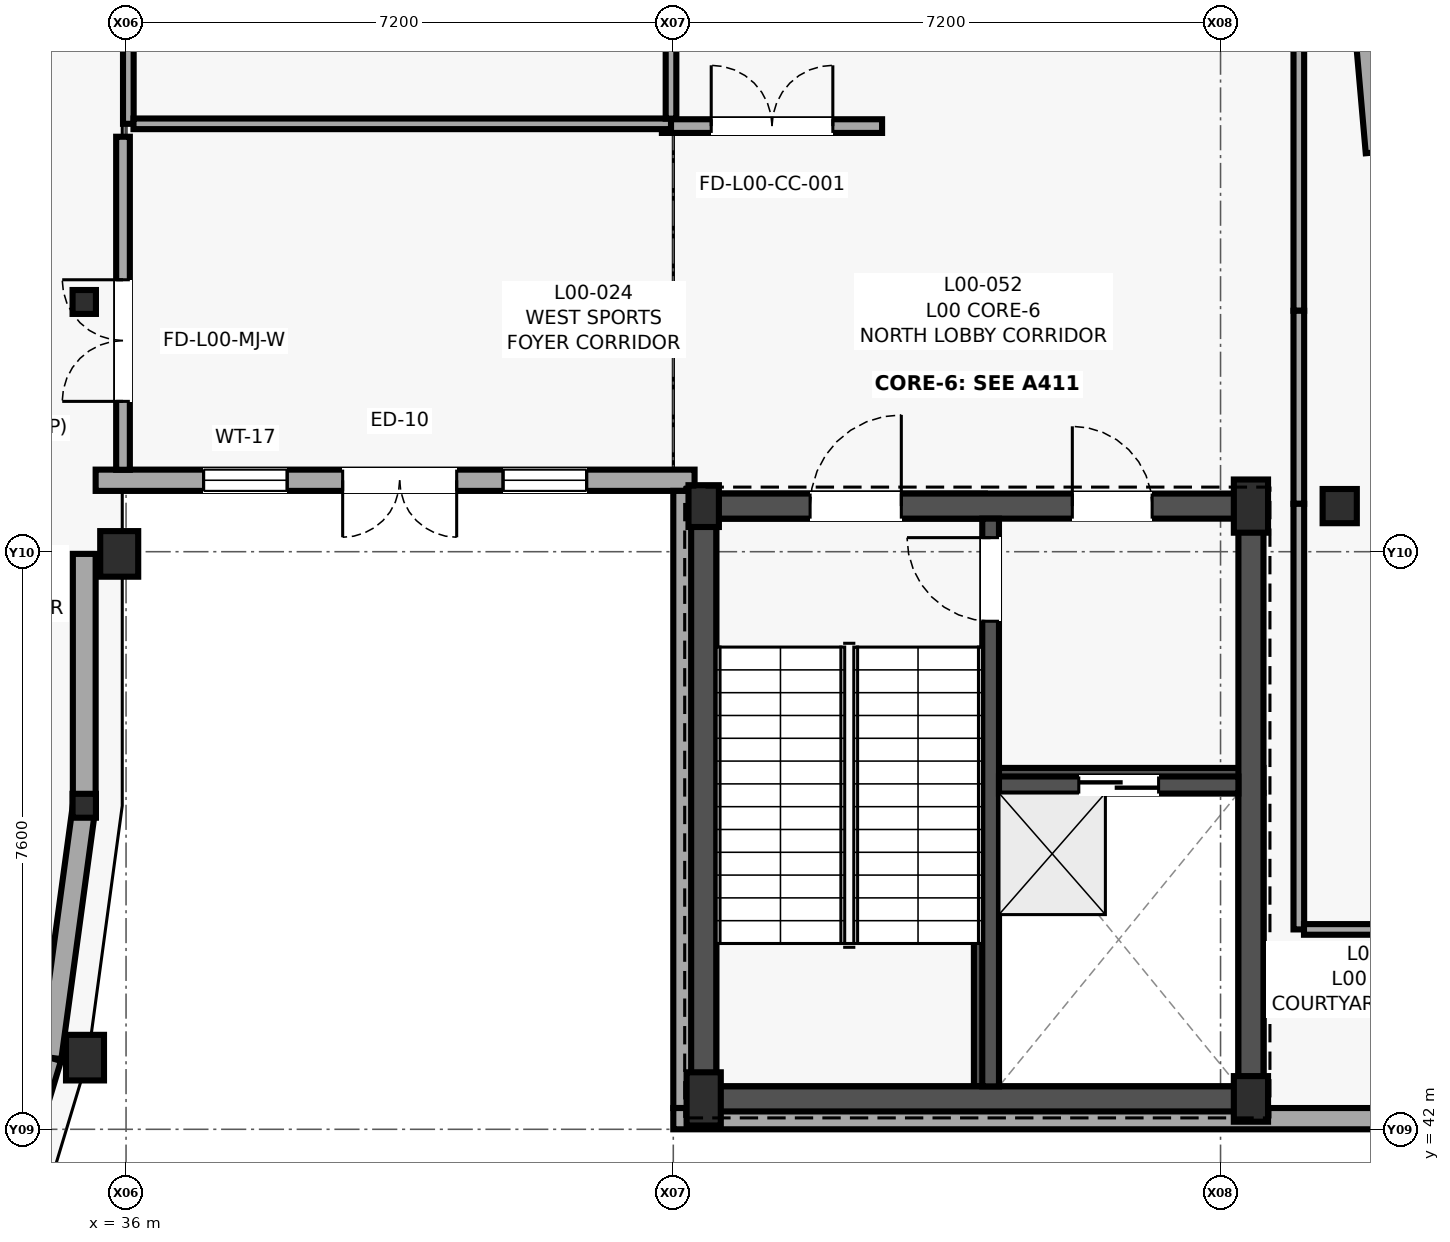
"""IFC4 building model, lengths in metres.
Left out: names, types, materials, properties, quantities, classifications, styles, units other than length and angle.
Written with IfcOpenShell. Run it as: python <this file> out.ifc"""

import sys

from ifc_helpers import new_model, si_unit, direction, frame, frame_2d, origin, origin_2d, place, context, subcontext, project, spatial, rectangle, circle, i_section, extrude, element, fill, save


model = new_model("IFC4")
c1 = context("Model", 3, precision=1e-05, world=origin(), true_north=direction((0.0, 1.0)))
c2 = subcontext(c1, "Body", "Model", "MODEL_VIEW")
j1 = project(units=[si_unit("LENGTHUNIT", "METRE"), si_unit("PLANEANGLEUNIT", "RADIAN")], contexts=[c1])
p1 = place(None, origin())
s1 = spatial("IfcSite", under=j1, at=p1, CompositionType="ELEMENT")
p2 = place(p1, origin())
s2 = spatial("IfcBuilding", under=s1, at=p2, CompositionType="ELEMENT")
p3 = place(p2, origin())
s3 = spatial("IfcBuildingStorey", under=s2, at=p3, CompositionType="ELEMENT", Elevation=0.0)
for number, where, z_axis, x_axis in (
    (1, (47.155, 42.4, -1.55), (0.0, 0.0, 1.0), (1.0, 0.0, 0.0)),
    (2, (47.155, 46.59, -1.55), (0.0, 0.0, 1.0), (1.0, 0.0, 0.0)),
):
    element("IfcWall", number, at=place(p3, frame(where, z_axis=z_axis, x_axis=x_axis)), inside=s3, PredefinedType="SHEAR", context=c2, shape_type="SweptSolid", body=[
        extrude(rectangle(XDim=3.81, YDim=0.33, at=frame_2d((1.905, 0.0))), origin(), (0.0, 0.0, 1.0), 1.3),
    ])
for number, where, z_axis, x_axis in (
    (3, (47.32, 42.565, -1.55), (0.0, 0.0, 1.0), (0.0, 1.0, 0.0)),
    (4, (50.8, 42.565, -1.55), (0.0, 0.0, 1.0), (0.0, 1.0, 0.0)),
):
    element("IfcWall", number, at=place(p3, frame(where, z_axis=z_axis, x_axis=x_axis)), inside=s3, PredefinedType="SHEAR", context=c2, shape_type="SweptSolid", body=[
        extrude(rectangle(XDim=3.86, YDim=0.33, at=frame_2d((1.93, 0.0))), origin(), (0.0, 0.0, 1.0), 1.3),
    ])
p4 = place(p3, frame((43.6, 42.565, -1.85), z_axis=(0.0, 0.0, 1.0), x_axis=(0.0, 1.0, 0.0)))
e5 = element("IfcWall", 5, at=p4, inside=s3, PredefinedType="SHEAR", context=c2, shape_type="SweptSolid", body=[
    extrude(rectangle(XDim=7.47, YDim=0.33, at=frame_2d((3.735, 0.0))), origin(), (0.0, 0.0, 1.0), 1.6),
])
for number, where, z_axis, x_axis in (
    (6, (43.435, 42.4, -1.85), (0.0, 0.0, 1.0), (1.0, 0.0, 0.0)),
    (7, (43.435, 50.2, -1.85), (0.0, 0.0, 1.0), (1.0, 0.0, 0.0)),
):
    element("IfcWall", number, at=place(p3, frame(where, z_axis=z_axis, x_axis=x_axis)), inside=s3, PredefinedType="SHEAR", context=c2, shape_type="SweptSolid", body=[
        extrude(rectangle(XDim=3.865, YDim=0.33, at=frame_2d((1.933, 0.0))), origin(), (0.0, 0.0, 1.0), 1.6),
    ])
for number, where, z_axis, x_axis in (
    (8, (35.45, 46.257, 0.0), (0.0, 0.0, 1.0), (1.0, 0.0, 0.0)),
    (9, (35.45, 52.886, 0.0), (0.0, 0.0, 1.0), (1.0, 0.0, 0.0)),
):
    element("IfcColumn", number, at=place(p3, frame(where, z_axis=z_axis, x_axis=x_axis)), inside=s3, PredefinedType="COLUMN", context=c2, shape_type="SweptSolid", body=[
        extrude(i_section(OverallWidth=0.307, OverallDepth=0.314, WebThickness=0.012, FlangeThickness=0.019, FilletRadius=0.015, at=origin_2d()), origin(), (0.0, 0.0, 1.0), 4.2),
    ])
for number, where, z_axis, x_axis in (
    (10, (35.46, 42.943, 0.0), (0.0, 0.0, 1.0), (1.0, 0.0, 0.0)),
    (11, (35.91, 49.571, 0.0), (0.0, 0.0, 1.0), (1.0, 0.0, 0.0)),
):
    element("IfcColumn", number, at=place(p3, frame(where, z_axis=z_axis, x_axis=x_axis)), inside=s3, PredefinedType="PILASTER", context=c2, shape_type="SweptSolid", body=[
        extrude(rectangle(XDim=0.5, YDim=0.6, at=origin_2d()), origin(), (0.0, 0.0, 1.0), 4.2),
    ])
p5 = place(p3, frame((43.6, 42.4, 0.0), z_axis=(0.0, 0.0, 1.0), x_axis=(1.0, 0.0, 0.0)))
e12 = element("IfcColumn", 12, at=p5, inside=s3, PredefinedType="COLUMN", context=c2, shape_type="SweptSolid", body=[
    extrude(rectangle(XDim=0.45, YDim=0.7, at=origin_2d()), origin(), (0.0, 0.0, 1.0), 4.2),
])
p6 = place(p3, frame((43.6, 50.2, 0.0), z_axis=(0.0, 0.0, 1.0), x_axis=(1.0, 0.0, 0.0)))
e13 = element("IfcColumn", 13, at=p6, inside=s3, PredefinedType="COLUMN", context=c2, shape_type="SweptSolid", body=[
    extrude(rectangle(XDim=0.4, YDim=0.55, at=origin_2d()), origin(), (0.0, 0.0, 1.0), 4.2),
])
p7 = place(p3, frame((50.8, 42.4, 0.0), z_axis=(0.0, 0.0, 1.0), x_axis=(1.0, 0.0, 0.0)))
e14 = element("IfcColumn", 14, at=p7, inside=s3, PredefinedType="COLUMN", context=c2, shape_type="SweptSolid", body=[
    extrude(rectangle(XDim=0.45, YDim=0.6, at=origin_2d()), origin(), (0.0, 0.0, 1.0), 4.2),
])
p8 = place(p3, frame((50.8, 50.2, 0.0), z_axis=(0.0, 0.0, 1.0), x_axis=(1.0, 0.0, 0.0)))
e15 = element("IfcColumn", 15, at=p8, inside=s3, PredefinedType="COLUMN", context=c2, shape_type="SweptSolid", body=[
    extrude(rectangle(XDim=0.45, YDim=0.7, at=origin_2d()), origin(), (0.0, 0.0, 1.0), 4.2),
])
p9 = place(p3, frame((51.968, 50.2, 0.0), z_axis=(0.0, 0.0, 1.0), x_axis=(1.0, 0.0, 0.0)))
e16 = element("IfcColumn", 16, at=p9, inside=s3, PredefinedType="COLUMN", context=c2, shape_type="SweptSolid", body=[
    extrude(circle(Radius=0.225, at=origin_2d()), origin(), (0.0, 0.0, 1.0), 4.2),
])
p10 = place(p3, frame((34.0, 39.629, 0.0), z_axis=(0.0, 0.0, 1.0), x_axis=(0.288868004026, 0.957368934241, 0.0)))
e17 = element("IfcWall", 17, at=p10, inside=s3, PredefinedType="SOLIDWALL", context=c2, shape_type="SweptSolid", body=[
    extrude(rectangle(XDim=3.462, YDim=0.3, at=frame_2d((1.731, 0.0))), origin(), (0.0, 0.0, 1.0), 3.68),
])
p11 = place(p3, frame((35.0, 42.943, 0.0), z_axis=(0.0, 0.0, 1.0), x_axis=(0.134539839792, 0.990908185206, 0.0)))
e18 = element("IfcWall", 18, at=p11, inside=s3, PredefinedType="SOLIDWALL", context=c2, shape_type="SweptSolid", body=[
    extrude(rectangle(XDim=3.344, YDim=0.3, at=frame_2d((1.672, 0.0))), origin(), (0.0, 0.0, 1.0), 3.68),
])
p12 = place(p3, frame((35.45, 46.257, 0.0), z_axis=(0.0, 0.0, 1.0), x_axis=(0.0, 1.0, 0.0)))
e19 = element("IfcWall", 19, at=p12, inside=s3, PredefinedType="SOLIDWALL", context=c2, shape_type="SweptSolid", body=[
    extrude(rectangle(XDim=3.314, YDim=0.3, at=frame_2d((1.657, 0.0))), origin(), (0.0, 0.0, 1.0), 3.68),
])
p13 = place(p3, frame((35.6, 50.54, 0.0), z_axis=(0.0, 0.0, 1.0), x_axis=(1.0, 0.0, 0.0)))
e20 = element("IfcWall", 20, at=p13, inside=s3, PredefinedType="SOLIDWALL", context=c2, shape_type="SweptSolid", body=[
    extrude(rectangle(XDim=7.88, YDim=0.28, at=frame_2d((3.94, 0.0))), origin(), (0.0, 0.0, 1.0), 3.98),
])
p14 = place(p13, frame((3.25, 0.0, 0.0)))
e21 = element("IfcOpeningElement", 21, at=p14, cuts=e20, PredefinedType="OPENING", context=c2, shape_type="SweptSolid", body=[
    extrude(rectangle(XDim=1.5, YDim=2.2, at=frame_2d((0.75, 1.1))), frame((0.0, 0.15, 0.0), z_axis=(0.0, -1.0, 0.0), x_axis=(1.0, 0.0, 0.0)), (0.0, 0.0, 1.0), 0.3),
])
p15 = place(p13, frame((1.42, 0.0, 0.75)))
e22 = element("IfcOpeningElement", 22, at=p15, cuts=e20, PredefinedType="OPENING", context=c2, shape_type="SweptSolid", body=[
    extrude(rectangle(XDim=1.1, YDim=2.1, at=frame_2d((0.55, 1.05))), frame((0.0, 0.15, 0.0), z_axis=(0.0, -1.0, 0.0), x_axis=(1.0, 0.0, 0.0)), (0.0, 0.0, 1.0), 0.3),
])
p16 = place(p13, frame((5.36, 0.0, 0.75)))
e23 = element("IfcOpeningElement", 23, at=p16, cuts=e20, PredefinedType="OPENING", context=c2, shape_type="SweptSolid", body=[
    extrude(rectangle(XDim=1.1, YDim=2.1, at=frame_2d((0.55, 1.05))), frame((0.0, 0.15, 0.0), z_axis=(0.0, -1.0, 0.0), x_axis=(1.0, 0.0, 0.0)), (0.0, 0.0, 1.0), 0.3),
])
p17 = place(p3, frame((43.34, 50.4, 0.0), z_axis=(0.0, 0.0, 1.0), x_axis=(0.0, -1.0, 0.0)))
e24 = element("IfcWall", 24, at=p17, inside=s3, PredefinedType="SOLIDWALL", context=c2, shape_type="SweptSolid", body=[
    extrude(rectangle(XDim=8.12, YDim=0.28, at=frame_2d((4.06, 0.0))), origin(), (0.0, 0.0, 1.0), 3.98),
])
p18 = place(p3, frame((43.2, 42.14, 0.0), z_axis=(0.0, 0.0, 1.0), x_axis=(1.0, 0.0, 0.0)))
e25 = element("IfcWall", 25, at=p18, inside=s3, PredefinedType="SOLIDWALL", context=c2, shape_type="SweptSolid", body=[
    extrude(rectangle(XDim=12.093, YDim=0.28, at=frame_2d((6.046, 0.0))), origin(), (0.0, 0.0, 1.0), 3.98),
])
p19 = place(p18, frame((10.0, 0.0, 0.0)))
e26 = element("IfcOpeningElement", 26, at=p19, cuts=e25, PredefinedType="OPENING", context=c2, shape_type="SweptSolid", body=[
    extrude(rectangle(XDim=1.6, YDim=2.3, at=frame_2d((0.8, 1.15))), frame((0.0, 0.15, 0.0), z_axis=(0.0, -1.0, 0.0), x_axis=(1.0, 0.0, 0.0)), (0.0, 0.0, 1.0), 0.3),
])
p20 = place(p3, frame((52.259, 56.813, 0.0), z_axis=(0.0, 0.0, 1.0), x_axis=(0.086865228015, -0.996220072154, 0.0)))
e27 = element("IfcWall", 27, at=p20, inside=s3, PredefinedType="SOLIDWALL", context=c2, shape_type="SweptSolid", body=[
    extrude(rectangle(XDim=1.967, YDim=0.24, at=frame_2d((0.984, 0.0))), origin(), (0.0, 0.0, 1.0), 3.98),
])
p21 = place(p3, frame((43.435, 42.4, 0.0), z_axis=(0.0, 0.0, 1.0), x_axis=(1.0, 0.0, 0.0)))
e28 = element("IfcWall", 28, at=p21, inside=s3, PredefinedType="SHEAR", context=c2, shape_type="SweptSolid", body=[
    extrude(rectangle(XDim=7.53, YDim=0.33, at=frame_2d((3.765, 0.0))), origin(), (0.0, 0.0, 1.0), 3.98),
])
p22 = place(p3, frame((43.435, 50.2, 0.0), z_axis=(0.0, 0.0, 1.0), x_axis=(1.0, 0.0, 0.0)))
e29 = element("IfcWall", 29, at=p22, inside=s3, PredefinedType="SHEAR", context=c2, shape_type="SweptSolid", body=[
    extrude(rectangle(XDim=7.53, YDim=0.33, at=frame_2d((3.765, 0.0))), origin(), (0.0, 0.0, 1.0), 3.98),
])
p23 = place(p22, frame((5.015, 0.0, 0.0)))
e30 = element("IfcOpeningElement", 30, at=p23, cuts=e29, PredefinedType="OPENING", context=c2, shape_type="SweptSolid", body=[
    extrude(rectangle(XDim=1.05, YDim=2.15, at=frame_2d((0.525, 1.075))), frame((0.0, 0.175, 0.0), z_axis=(0.0, -1.0, 0.0), x_axis=(1.0, 0.0, 0.0)), (0.0, 0.0, 1.0), 0.35),
])
p24 = place(p22, frame((1.565, 0.0, 0.0)))
e31 = element("IfcOpeningElement", 31, at=p24, cuts=e29, PredefinedType="OPENING", context=c2, shape_type="SweptSolid", body=[
    extrude(rectangle(XDim=1.2, YDim=2.2, at=frame_2d((0.6, 1.1))), frame((0.0, 0.175, 0.0), z_axis=(0.0, -1.0, 0.0), x_axis=(1.0, 0.0, 0.0)), (0.0, 0.0, 1.0), 0.35),
])
for number, where, z_axis, x_axis in (
    (32, (43.6, 42.565, 0.0), (0.0, 0.0, 1.0), (0.0, 1.0, 0.0)),
    (33, (50.8, 42.565, 0.0), (0.0, 0.0, 1.0), (0.0, 1.0, 0.0)),
):
    element("IfcWall", number, at=place(p3, frame(where, z_axis=z_axis, x_axis=x_axis)), inside=s3, PredefinedType="SHEAR", context=c2, shape_type="SweptSolid", body=[
        extrude(rectangle(XDim=7.47, YDim=0.33, at=frame_2d((3.735, 0.0))), origin(), (0.0, 0.0, 1.0), 3.98),
    ])
p25 = place(p3, frame((47.375, 42.565, 0.0), z_axis=(0.0, 0.0, 1.0), x_axis=(0.0, 1.0, 0.0)))
e34 = element("IfcWall", 34, at=p25, inside=s3, PredefinedType="SHEAR", context=c2, shape_type="SweptSolid", body=[
    extrude(rectangle(XDim=7.47, YDim=0.22, at=frame_2d((3.735, 0.0))), origin(), (0.0, 0.0, 1.0), 3.98),
])
p26 = place(p25, frame((6.12, 0.0, 0.0)))
e35 = element("IfcOpeningElement", 35, at=p26, cuts=e34, PredefinedType="OPENING", context=c2, shape_type="SweptSolid", body=[
    extrude(rectangle(XDim=1.1, YDim=2.15, at=frame_2d((0.55, 1.075))), frame((0.0, 0.12, 0.0), z_axis=(0.0, -1.0, 0.0), x_axis=(1.0, 0.0, 0.0)), (0.0, 0.0, 1.0), 0.24),
])
p27 = place(p3, frame((47.485, 46.53, 0.0), z_axis=(0.0, 0.0, 1.0), x_axis=(1.0, 0.0, 0.0)))
e36 = element("IfcWall", 36, at=p27, inside=s3, PredefinedType="SHEAR", context=c2, shape_type="SweptSolid", body=[
    extrude(rectangle(XDim=3.15, YDim=0.225, at=frame_2d((1.575, 0.0))), origin(), (0.0, 0.0, 1.0), 3.98),
])
p28 = place(p27, frame((1.05, 0.0, 0.0)))
e37 = element("IfcOpeningElement", 37, at=p28, cuts=e36, PredefinedType="OPENING", context=c2, shape_type="SweptSolid", body=[
    extrude(rectangle(XDim=1.05, YDim=2.2, at=frame_2d((0.525, 1.1))), frame((0.0, 0.123, 0.0), z_axis=(0.0, -1.0, 0.0), x_axis=(1.0, 0.0, 0.0)), (0.0, 0.0, 1.0), 0.245),
])
p29 = place(p3, frame((35.96, 50.678, 0.0), z_axis=(0.0, 0.0, 1.0), x_axis=(0.0, 1.0, 0.0)))
e38 = element("IfcWall", 38, at=p29, inside=s3, PredefinedType="PARTITIONING", context=c2, shape_type="SweptSolid", body=[
    extrude(rectangle(XDim=4.382, YDim=0.18, at=frame_2d((2.191, 0.0))), origin(), (0.0, 0.0, 1.0), 3.98),
])
p30 = place(p29, frame((0.9, 0.0, 0.0)))
e39 = element("IfcOpeningElement", 39, at=p30, cuts=e38, PredefinedType="OPENING", context=c2, shape_type="SweptSolid", body=[
    extrude(rectangle(XDim=1.6, YDim=2.25, at=frame_2d((0.8, 1.125))), frame((0.0, 0.1, 0.0), z_axis=(0.0, -1.0, 0.0), x_axis=(1.0, 0.0, 0.0)), (0.0, 0.0, 1.0), 0.2),
])
p31 = place(p3, frame((43.05, 55.2, 0.0), z_axis=(0.0, 0.0, 1.0), x_axis=(1.0, 0.0, 0.0)))
e40 = element("IfcWall", 40, at=p31, inside=s3, PredefinedType="PARTITIONING", context=c2, shape_type="SweptSolid", body=[
    extrude(rectangle(XDim=2.897, YDim=0.18, at=frame_2d((1.448, 0.0))), origin(), (0.0, 0.0, 1.0), 3.98),
])
p32 = place(p31, frame((0.649, 0.0, 0.0)))
e41 = element("IfcOpeningElement", 41, at=p32, cuts=e40, PredefinedType="OPENING", context=c2, shape_type="SweptSolid", body=[
    extrude(rectangle(XDim=1.6, YDim=2.25, at=frame_2d((0.8, 1.125))), frame((0.0, 0.1, 0.0), z_axis=(0.0, -1.0, 0.0), x_axis=(1.0, 0.0, 0.0)), (0.0, 0.0, 1.0), 0.2),
])
p33 = place(p3, frame((36.03, 63.722, 0.0), z_axis=(0.0, 0.0, 1.0), x_axis=(0.0, -1.0, 0.0)))
e42 = element("IfcWall", 42, at=p33, inside=s3, PredefinedType="PARTITIONING", context=c2, shape_type="SweptSolid", body=[
    extrude(rectangle(XDim=8.492, YDim=0.14, at=frame_2d((4.246, 0.0))), origin(), (0.0, 0.0, 1.0), 3.975),
])
p34 = place(p33, frame((2.657, 0.0, 0.0)))
e43 = element("IfcOpeningElement", 43, at=p34, cuts=e42, PredefinedType="OPENING", context=c2, shape_type="SweptSolid", body=[
    extrude(rectangle(XDim=0.9, YDim=2.02, at=frame_2d((0.45, 1.01))), frame((0.0, 0.08, 0.0), z_axis=(0.0, -1.0, 0.0), x_axis=(1.0, 0.0, 0.0)), (0.0, 0.0, 1.0), 0.16),
])
p35 = place(p3, frame((36.098, 55.23, 0.0), z_axis=(0.0, 0.0, 1.0), x_axis=(1.0, 0.0, 0.0)))
e44 = element("IfcWall", 44, at=p35, inside=s3, PredefinedType="PARTITIONING", context=c2, shape_type="SweptSolid", body=[
    extrude(rectangle(XDim=7.072, YDim=0.14, at=frame_2d((3.536, 0.0))), origin(), (0.0, 0.0, 1.0), 3.975),
])
p36 = place(p3, frame((43.17, 55.298, 0.0), z_axis=(0.0, 0.0, 1.0), x_axis=(0.0, 1.0, 0.0)))
e45 = element("IfcWall", 45, at=p36, inside=s3, PredefinedType="PARTITIONING", context=c2, shape_type="SweptSolid", body=[
    extrude(rectangle(XDim=8.424, YDim=0.14, at=frame_2d((4.212, 0.0))), origin(), (0.0, 0.0, 1.0), 3.375),
])
p37 = place(p3, frame((51.43, 56.77, 0.0), z_axis=(0.0, 0.0, 1.0), x_axis=(0.0, -1.0, 0.0)))
e46 = element("IfcWall", 46, at=p37, inside=s3, PredefinedType="PARTITIONING", context=c2, shape_type="SweptSolid", body=[
    extrude(rectangle(XDim=4.0, YDim=0.14, at=frame_2d((2.0, 0.0))), origin(), (0.0, 0.0, 1.0), 3.975),
])
p38 = place(p3, frame((51.43, 52.77, 0.0), z_axis=(0.0, 0.0, 1.0), x_axis=(0.0, -1.0, 0.0)))
e47 = element("IfcWall", 47, at=p38, inside=s3, PredefinedType="PARTITIONING", context=c2, shape_type="SweptSolid", body=[
    extrude(rectangle(XDim=2.54, YDim=0.14, at=frame_2d((1.27, 0.0))), origin(), (0.0, 0.0, 1.0), 3.975),
])
p39 = place(p3, frame((51.43, 50.23, 0.0), z_axis=(0.0, 0.0, 1.0), x_axis=(0.0, -1.0, 0.0)))
e48 = element("IfcWall", 48, at=p39, inside=s3, PredefinedType="PARTITIONING", context=c2, shape_type="SweptSolid", body=[
    extrude(rectangle(XDim=5.6, YDim=0.14, at=frame_2d((2.8, 0.0))), origin(), (0.0, 0.0, 1.0), 3.975),
])
p40 = place(p3, frame((51.498, 44.63, 0.0), z_axis=(0.0, 0.0, 1.0), x_axis=(1.0, 0.0, 0.0)))
e49 = element("IfcWall", 49, at=p40, inside=s3, PredefinedType="PARTITIONING", context=c2, shape_type="SweptSolid", body=[
    extrude(rectangle(XDim=11.872, YDim=0.14, at=frame_2d((5.936, 0.0))), origin(), (0.0, 0.0, 1.0), 3.975),
])
p41 = place(p40, frame((5.436, 0.0, 0.0)))
e50 = element("IfcOpeningElement", 50, at=p41, cuts=e49, PredefinedType="OPENING", context=c2, shape_type="SweptSolid", body=[
    extrude(rectangle(XDim=1.0, YDim=2.1, at=frame_2d((0.5, 1.05))), frame((0.0, 0.08, 0.0), z_axis=(0.0, -1.0, 0.0), x_axis=(1.0, 0.0, 0.0)), (0.0, 0.0, 1.0), 0.16),
])
p42 = place(p40, frame((7.136, 0.0, 1.05)))
e51 = element("IfcOpeningElement", 51, at=p42, cuts=e49, PredefinedType="OPENING", context=c2, shape_type="SweptSolid", body=[
    extrude(rectangle(XDim=1.6, YDim=1.1, at=frame_2d((0.8, 0.55))), frame((0.0, 0.08, 0.0), z_axis=(0.0, -1.0, 0.0), x_axis=(1.0, 0.0, 0.0)), (0.0, 0.0, 1.0), 0.16),
])
p43 = place(p14, frame((1.5, 0.0, 0.0), z_axis=(0.0, 0.0, 1.0), x_axis=(-1.0, 0.0, 0.0)))
e52 = element("IfcDoor", 52, at=p43, inside=s3, OperationType="DOUBLE_DOOR_SINGLE_SWING", PredefinedType="DOOR", context=c2, shape_type="SweptSolid", body=[
    extrude(rectangle(XDim=1.5, YDim=2.2, at=frame_2d((0.75, 1.1))), frame((0.0, 0.025, 0.0), z_axis=(0.0, -1.0, 0.0), x_axis=(1.0, 0.0, 0.0)), (0.0, 0.0, 1.0), 0.05),
])
fill(e21, e52)
p44 = place(p15, origin())
e53 = element("IfcWindow", 53, at=p44, inside=s3, PartitioningType="SINGLE_PANEL", PredefinedType="WINDOW", context=c2, shape_type="SweptSolid", body=[
    extrude(rectangle(XDim=1.1, YDim=2.1, at=frame_2d((0.55, 1.05))), frame((0.0, 0.03, 0.0), z_axis=(0.0, -1.0, 0.0), x_axis=(1.0, 0.0, 0.0)), (0.0, 0.0, 1.0), 0.06),
])
fill(e22, e53)
p45 = place(p16, origin())
e54 = element("IfcWindow", 54, at=p45, inside=s3, PartitioningType="SINGLE_PANEL", PredefinedType="WINDOW", context=c2, shape_type="SweptSolid", body=[
    extrude(rectangle(XDim=1.1, YDim=2.1, at=frame_2d((0.55, 1.05))), frame((0.0, 0.03, 0.0), z_axis=(0.0, -1.0, 0.0), x_axis=(1.0, 0.0, 0.0)), (0.0, 0.0, 1.0), 0.06),
])
fill(e23, e54)
p46 = place(p28, origin())
e55 = element("IfcDoor", 55, at=p46, inside=s3, OperationType="SLIDING_TO_LEFT", PredefinedType="DOOR", context=c2, shape_type="SweptSolid", body=[
    extrude(rectangle(XDim=1.05, YDim=2.2, at=frame_2d((0.525, 1.1))), frame((0.0, 0.025, 0.0), z_axis=(0.0, -1.0, 0.0), x_axis=(1.0, 0.0, 0.0)), (0.0, 0.0, 1.0), 0.05),
])
fill(e37, e55)
p47 = place(p26, origin())
e56 = element("IfcDoor", 56, at=p47, inside=s3, OperationType="SINGLE_SWING_RIGHT", PredefinedType="DOOR", context=c2, shape_type="SweptSolid", body=[
    extrude(rectangle(XDim=1.1, YDim=2.15, at=frame_2d((0.55, 1.075))), frame((0.0, 0.025, 0.0), z_axis=(0.0, -1.0, 0.0), x_axis=(1.0, 0.0, 0.0)), (0.0, 0.0, 1.0), 0.05),
])
fill(e35, e56)
p48 = place(p23, origin())
e57 = element("IfcDoor", 57, at=p48, inside=s3, OperationType="SINGLE_SWING_LEFT", PredefinedType="DOOR", context=c2, shape_type="SweptSolid", body=[
    extrude(rectangle(XDim=1.05, YDim=2.15, at=frame_2d((0.525, 1.075))), frame((0.0, 0.025, 0.0), z_axis=(0.0, -1.0, 0.0), x_axis=(1.0, 0.0, 0.0)), (0.0, 0.0, 1.0), 0.05),
])
fill(e30, e57)
p49 = place(p24, origin())
e58 = element("IfcDoor", 58, at=p49, inside=s3, OperationType="SINGLE_SWING_RIGHT", PredefinedType="DOOR", context=c2, shape_type="SweptSolid", body=[
    extrude(rectangle(XDim=1.2, YDim=2.2, at=frame_2d((0.6, 1.1))), frame((0.0, 0.025, 0.0), z_axis=(0.0, -1.0, 0.0), x_axis=(1.0, 0.0, 0.0)), (0.0, 0.0, 1.0), 0.05),
])
fill(e31, e58)
p50 = place(p30, origin())
e59 = element("IfcDoor", 59, at=p50, inside=s3, OperationType="DOUBLE_DOOR_SINGLE_SWING", PredefinedType="DOOR", context=c2, shape_type="SweptSolid", body=[
    extrude(rectangle(XDim=1.6, YDim=2.25, at=frame_2d((0.8, 1.125))), frame((0.0, 0.025, 0.0), z_axis=(0.0, -1.0, 0.0), x_axis=(1.0, 0.0, 0.0)), (0.0, 0.0, 1.0), 0.05),
])
fill(e39, e59)
p51 = place(p32, origin())
e60 = element("IfcDoor", 60, at=p51, inside=s3, OperationType="DOUBLE_DOOR_SINGLE_SWING", PredefinedType="DOOR", context=c2, shape_type="SweptSolid", body=[
    extrude(rectangle(XDim=1.6, YDim=2.25, at=frame_2d((0.8, 1.125))), frame((0.0, 0.025, 0.0), z_axis=(0.0, -1.0, 0.0), x_axis=(1.0, 0.0, 0.0)), (0.0, 0.0, 1.0), 0.05),
])
fill(e41, e60)
save(model, sys.argv[1])
